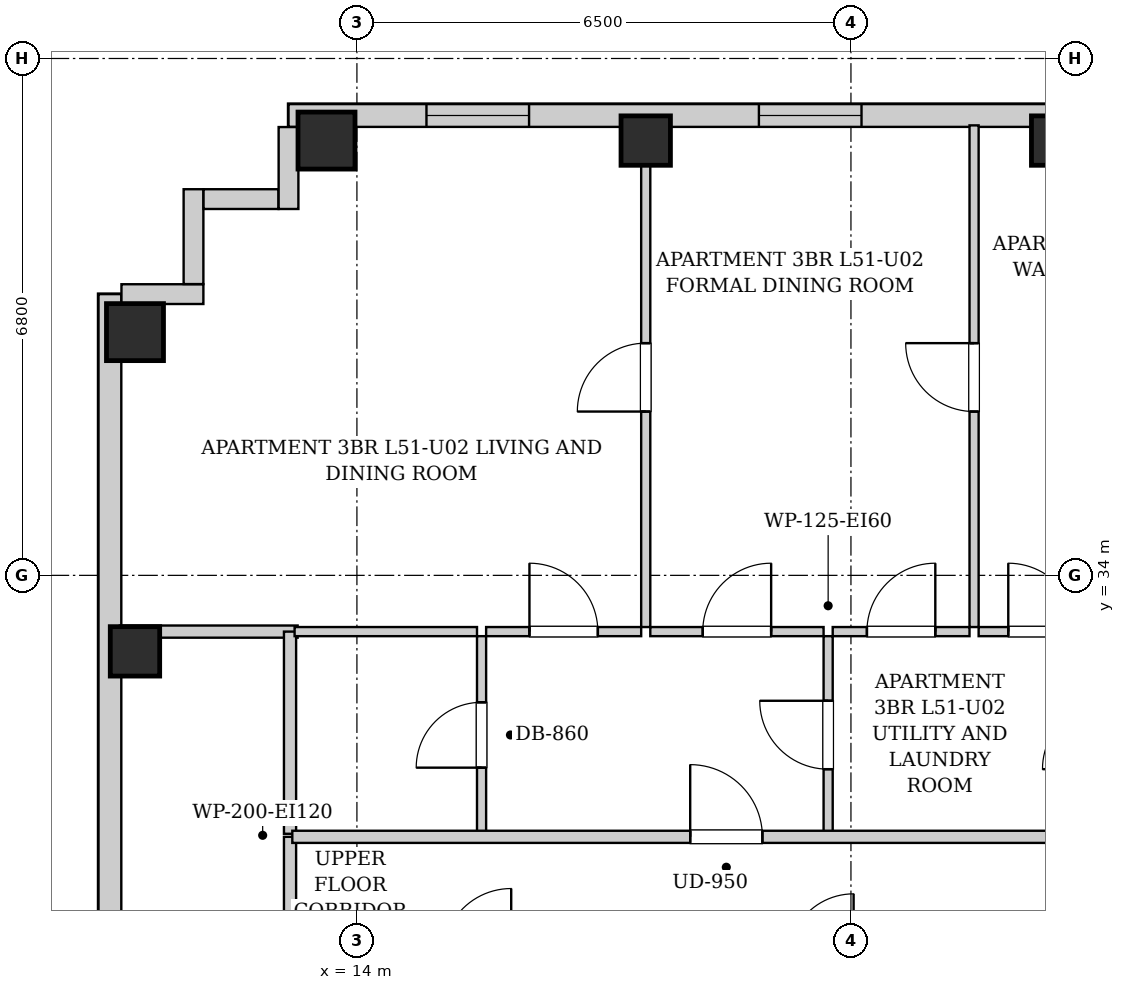
"""IFC4 building model, lengths in metres.
Left out: names, types, materials, properties, quantities, classifications, styles, units other than length and angle.
Written with IfcOpenShell. Run it as: python <this file> out.ifc"""

import sys

from ifc_helpers import new_model, si_unit, direction, frame, frame_2d, origin, origin_2d, place, context, subcontext, project, spatial, rectangle, extrude, element, fill, save


model = new_model("IFC4")
c1 = context("Model", 3, precision=1e-05, world=origin(), true_north=direction((0.0, 1.0)))
c2 = subcontext(c1, "Body", "Model", "MODEL_VIEW")
j1 = project(units=[si_unit("LENGTHUNIT", "METRE"), si_unit("PLANEANGLEUNIT", "RADIAN")], contexts=[c1])
p1 = place(None, origin())
s1 = spatial("IfcSite", under=j1, at=p1, CompositionType="ELEMENT")
p2 = place(p1, origin())
s2 = spatial("IfcBuilding", under=s1, at=p2, CompositionType="ELEMENT")
p3 = place(p2, frame((0.0, 0.0, 177.7)))
s3 = spatial("IfcBuildingStorey", under=s2, at=p3, CompositionType="ELEMENT", Elevation=177.7)
p4 = place(p3, frame((13.6, 39.72, 0.0), z_axis=(0.0, 0.0, 1.0), x_axis=(1.0, 0.0, 0.0)))
e1 = element("IfcColumn", 1, at=p4, inside=s3, PredefinedType="COLUMN", context=c2, shape_type="SweptSolid", body=[
    extrude(rectangle(XDim=0.75, YDim=0.75, at=origin_2d()), origin(), (0.0, 0.0, 1.0), 3.3),
])
for number, where, z_axis, x_axis in (
    (2, (17.8, 39.72, 0.0), (0.0, 0.0, 1.0), (1.0, 0.0, 0.0)),
    (3, (23.2, 39.72, 0.0), (0.0, 0.0, 1.0), (1.0, 0.0, 0.0)),
    (4, (11.08, 33.0, 0.0), (0.0, 0.0, 1.0), (1.0, 0.0, 0.0)),
):
    element("IfcColumn", number, at=place(p3, frame(where, z_axis=z_axis, x_axis=x_axis)), inside=s3, PredefinedType="COLUMN", context=c2, shape_type="SweptSolid", body=[
        extrude(rectangle(XDim=0.65, YDim=0.65, at=origin_2d()), origin(), (0.0, 0.0, 1.0), 3.3),
    ])
p5 = place(p3, frame((11.08, 37.2, 0.0), z_axis=(0.0, 0.0, 1.0), x_axis=(1.0, 0.0, 0.0)))
e5 = element("IfcColumn", 5, at=p5, inside=s3, PredefinedType="COLUMN", context=c2, shape_type="SweptSolid", body=[
    extrude(rectangle(XDim=0.75, YDim=0.75, at=origin_2d()), origin(), (0.0, 0.0, 1.0), 3.3),
])
p6 = place(p3, frame((13.1, 40.05, 0.0), z_axis=(0.0, 0.0, 1.0), x_axis=(1.0, 0.0, 0.0)))
e6 = element("IfcWall", 6, at=p6, inside=s3, PredefinedType="SOLIDWALL", context=c2, shape_type="SweptSolid", body=[
    extrude(rectangle(XDim=17.5, YDim=0.3, at=frame_2d((8.75, 0.0))), origin(), (0.0, 0.0, 1.0), 3.04),
])
p7 = place(p6, frame((1.815, 0.0, 0.55)))
e7 = element("IfcOpeningElement", 7, at=p7, cuts=e6, PredefinedType="OPENING", context=c2, shape_type="SweptSolid", body=[
    extrude(rectangle(XDim=1.35, YDim=1.2, at=frame_2d((0.675, 0.6))), frame((0.0, 0.16, 0.0), z_axis=(0.0, -1.0, 0.0), x_axis=(1.0, 0.0, 0.0)), (0.0, 0.0, 1.0), 0.32),
])
p8 = place(p6, frame((6.189, 0.0, 0.55)))
e8 = element("IfcOpeningElement", 8, at=p8, cuts=e6, PredefinedType="OPENING", context=c2, shape_type="SweptSolid", body=[
    extrude(rectangle(XDim=1.35, YDim=1.2, at=frame_2d((0.675, 0.6))), frame((0.0, 0.16, 0.0), z_axis=(0.0, -1.0, 0.0), x_axis=(1.0, 0.0, 0.0)), (0.0, 0.0, 1.0), 0.32),
])
p9 = place(p6, frame((14.788, 0.0, 0.55)))
e9 = element("IfcOpeningElement", 9, at=p9, cuts=e6, PredefinedType="OPENING", context=c2, shape_type="SweptSolid", body=[
    extrude(rectangle(XDim=1.35, YDim=1.2, at=frame_2d((0.675, 0.6))), frame((0.0, 0.16, 0.0), z_axis=(0.0, -1.0, 0.0), x_axis=(1.0, 0.0, 0.0)), (0.0, 0.0, 1.0), 0.32),
])
p10 = place(p3, frame((10.75, 6.3, 0.0), z_axis=(0.0, 0.0, 1.0), x_axis=(0.0, 1.0, 0.0)))
e10 = element("IfcWall", 10, at=p10, inside=s3, PredefinedType="SOLIDWALL", context=c2, shape_type="SweptSolid", body=[
    extrude(rectangle(XDim=31.4, YDim=0.3, at=frame_2d((15.7, 0.0))), origin(), (0.0, 0.0, 1.0), 3.04),
])
p11 = place(p10, frame((1.653, 0.0, 0.55)))
e11 = element("IfcOpeningElement", 11, at=p11, cuts=e10, PredefinedType="OPENING", context=c2, shape_type="SweptSolid", body=[
    extrude(rectangle(XDim=1.35, YDim=1.2, at=frame_2d((0.675, 0.6))), frame((0.0, 0.16, 0.0), z_axis=(0.0, -1.0, 0.0), x_axis=(1.0, 0.0, 0.0)), (0.0, 0.0, 1.0), 0.32),
])
p12 = place(p10, frame((11.85, 0.0, 0.55)))
e12 = element("IfcOpeningElement", 12, at=p12, cuts=e10, PredefinedType="OPENING", context=c2, shape_type="SweptSolid", body=[
    extrude(rectangle(XDim=1.35, YDim=1.2, at=frame_2d((0.675, 0.6))), frame((0.0, 0.16, 0.0), z_axis=(0.0, -1.0, 0.0), x_axis=(1.0, 0.0, 0.0)), (0.0, 0.0, 1.0), 0.32),
])
p13 = place(p10, frame((9.185, 0.0, 0.55)))
e13 = element("IfcOpeningElement", 13, at=p13, cuts=e10, PredefinedType="OPENING", context=c2, shape_type="SweptSolid", body=[
    extrude(rectangle(XDim=1.35, YDim=1.2, at=frame_2d((0.675, 0.6))), frame((0.0, 0.16, 0.0), z_axis=(0.0, -1.0, 0.0), x_axis=(1.0, 0.0, 0.0)), (0.0, 0.0, 1.0), 0.32),
])
p14 = place(p10, frame((21.209, 0.0, 0.55)))
e14 = element("IfcOpeningElement", 14, at=p14, cuts=e10, PredefinedType="OPENING", context=c2, shape_type="SweptSolid", body=[
    extrude(rectangle(XDim=0.85, YDim=1.2, at=frame_2d((0.425, 0.6))), frame((0.0, 0.16, 0.0), z_axis=(0.0, -1.0, 0.0), x_axis=(1.0, 0.0, 0.0)), (0.0, 0.0, 1.0), 0.32),
])
p15 = place(p3, frame((10.902, 37.7, 0.0), z_axis=(0.0, 0.0, 1.0), x_axis=(1.0, 0.0, 0.0)))
e15 = element("IfcWall", 15, at=p15, inside=s3, PredefinedType="SOLIDWALL", context=c2, shape_type="SweptSolid", body=[
    extrude(rectangle(XDim=1.078, YDim=0.26, at=frame_2d((0.539, 0.0))), origin(), (0.0, 0.0, 1.0), 3.04),
])
p16 = place(p3, frame((11.85, 37.832, 0.0), z_axis=(0.0, 0.0, 1.0), x_axis=(0.0, 1.0, 0.0)))
e16 = element("IfcWall", 16, at=p16, inside=s3, PredefinedType="SOLIDWALL", context=c2, shape_type="SweptSolid", body=[
    extrude(rectangle(XDim=1.248, YDim=0.26, at=frame_2d((0.624, 0.0))), origin(), (0.0, 0.0, 1.0), 3.04),
])
p17 = place(p3, frame((11.982, 38.95, 0.0), z_axis=(0.0, 0.0, 1.0), x_axis=(1.0, 0.0, 0.0)))
e17 = element("IfcWall", 17, at=p17, inside=s3, PredefinedType="SOLIDWALL", context=c2, shape_type="SweptSolid", body=[
    extrude(rectangle(XDim=0.986, YDim=0.26, at=frame_2d((0.493, 0.0))), origin(), (0.0, 0.0, 1.0), 3.04),
])
p18 = place(p3, frame((13.1, 38.82, 0.0), z_axis=(0.0, 0.0, 1.0), x_axis=(0.0, 1.0, 0.0)))
e18 = element("IfcWall", 18, at=p18, inside=s3, PredefinedType="SOLIDWALL", context=c2, shape_type="SweptSolid", body=[
    extrude(rectangle(XDim=1.078, YDim=0.26, at=frame_2d((0.539, 0.0))), origin(), (0.0, 0.0, 1.0), 3.04),
])
p19 = place(p3, frame((13.12, 28.98, 0.0), z_axis=(0.0, 0.0, 1.0), x_axis=(0.0, 1.0, 0.0)))
e19 = element("IfcWall", 19, at=p19, inside=s3, PredefinedType="PARTITIONING", context=c2, shape_type="SweptSolid", body=[
    extrude(rectangle(XDim=1.58, YDim=0.16, at=frame_2d((0.79, 0.0))), origin(), (0.0, 0.0, 1.0), 3.04),
])
p20 = place(p3, frame((10.88, 33.26, 0.0), z_axis=(0.0, 0.0, 1.0), x_axis=(1.0, 0.0, 0.0)))
e20 = element("IfcWall", 20, at=p20, inside=s3, PredefinedType="PARTITIONING", context=c2, shape_type="SweptSolid", body=[
    extrude(rectangle(XDim=2.34, YDim=0.16, at=frame_2d((1.17, 0.0))), origin(), (0.0, 0.0, 1.0), 3.04),
])
p21 = place(p3, frame((13.12, 30.6, 0.0), z_axis=(0.0, 0.0, 1.0), x_axis=(0.0, 1.0, 0.0)))
e21 = element("IfcWall", 21, at=p21, inside=s3, PredefinedType="PARTITIONING", context=c2, shape_type="SweptSolid", body=[
    extrude(rectangle(XDim=2.66, YDim=0.16, at=frame_2d((1.33, 0.0))), origin(), (0.0, 0.0, 1.0), 3.04),
])
p22 = place(p3, frame((15.64, 30.6, 0.0), z_axis=(0.0, 0.0, 1.0), x_axis=(0.0, 1.0, 0.0)))
e22 = element("IfcWall", 22, at=p22, inside=s3, PredefinedType="PARTITIONING", context=c2, shape_type="SweptSolid", body=[
    extrude(rectangle(XDim=2.6, YDim=0.12, at=frame_2d((1.3, 0.0))), origin(), (0.0, 0.0, 1.0), 3.04),
])
p23 = place(p22, frame((0.87, 0.0, 0.0)))
e23 = element("IfcOpeningElement", 23, at=p23, cuts=e22, PredefinedType="OPENING", context=c2, shape_type="SweptSolid", body=[
    extrude(rectangle(XDim=0.86, YDim=2.05, at=frame_2d((0.43, 1.025))), frame((0.0, 0.07, 0.0), z_axis=(0.0, -1.0, 0.0), x_axis=(1.0, 0.0, 0.0)), (0.0, 0.0, 1.0), 0.14),
])
p24 = place(p3, frame((13.18, 33.26, 0.0), z_axis=(0.0, 0.0, 1.0), x_axis=(1.0, 0.0, 0.0)))
e24 = element("IfcWall", 24, at=p24, inside=s3, PredefinedType="PARTITIONING", context=c2, shape_type="SweptSolid", body=[
    extrude(rectangle(XDim=2.4, YDim=0.12, at=frame_2d((1.2, 0.0))), origin(), (0.0, 0.0, 1.0), 3.04),
])
p25 = place(p3, frame((20.2, 30.6, 0.0), z_axis=(0.0, 0.0, 1.0), x_axis=(0.0, 1.0, 0.0)))
e25 = element("IfcWall", 25, at=p25, inside=s3, PredefinedType="PARTITIONING", context=c2, shape_type="SweptSolid", body=[
    extrude(rectangle(XDim=2.6, YDim=0.12, at=frame_2d((1.3, 0.0))), origin(), (0.0, 0.0, 1.0), 3.04),
])
p26 = place(p25, frame((0.85, 0.0, 0.0)))
e26 = element("IfcOpeningElement", 26, at=p26, cuts=e25, PredefinedType="OPENING", context=c2, shape_type="SweptSolid", body=[
    extrude(rectangle(XDim=0.9, YDim=2.05, at=frame_2d((0.45, 1.025))), frame((0.0, 0.07, 0.0), z_axis=(0.0, -1.0, 0.0), x_axis=(1.0, 0.0, 0.0)), (0.0, 0.0, 1.0), 0.14),
])
p27 = place(p3, frame((15.7, 33.26, 0.0), z_axis=(0.0, 0.0, 1.0), x_axis=(1.0, 0.0, 0.0)))
e27 = element("IfcWall", 27, at=p27, inside=s3, PredefinedType="PARTITIONING", context=c2, shape_type="SweptSolid", body=[
    extrude(rectangle(XDim=2.04, YDim=0.12, at=frame_2d((1.02, 0.0))), origin(), (0.0, 0.0, 1.0), 3.04),
])
p28 = place(p27, frame((0.57, 0.0, 0.0)))
e28 = element("IfcOpeningElement", 28, at=p28, cuts=e27, PredefinedType="OPENING", context=c2, shape_type="SweptSolid", body=[
    extrude(rectangle(XDim=0.9, YDim=2.05, at=frame_2d((0.45, 1.025))), frame((0.0, 0.07, 0.0), z_axis=(0.0, -1.0, 0.0), x_axis=(1.0, 0.0, 0.0)), (0.0, 0.0, 1.0), 0.14),
])
p29 = place(p3, frame((17.86, 33.26, 0.0), z_axis=(0.0, 0.0, 1.0), x_axis=(1.0, 0.0, 0.0)))
e29 = element("IfcWall", 29, at=p29, inside=s3, PredefinedType="PARTITIONING", context=c2, shape_type="SweptSolid", body=[
    extrude(rectangle(XDim=2.28, YDim=0.12, at=frame_2d((1.14, 0.0))), origin(), (0.0, 0.0, 1.0), 3.04),
])
p30 = place(p29, frame((0.69, 0.0, 0.0)))
e30 = element("IfcOpeningElement", 30, at=p30, cuts=e29, PredefinedType="OPENING", context=c2, shape_type="SweptSolid", body=[
    extrude(rectangle(XDim=0.9, YDim=2.05, at=frame_2d((0.45, 1.025))), frame((0.0, 0.07, 0.0), z_axis=(0.0, -1.0, 0.0), x_axis=(1.0, 0.0, 0.0)), (0.0, 0.0, 1.0), 0.14),
])
p31 = place(p3, frame((20.26, 33.26, 0.0), z_axis=(0.0, 0.0, 1.0), x_axis=(1.0, 0.0, 0.0)))
e31 = element("IfcWall", 31, at=p31, inside=s3, PredefinedType="PARTITIONING", context=c2, shape_type="SweptSolid", body=[
    extrude(rectangle(XDim=1.8, YDim=0.12, at=frame_2d((0.9, 0.0))), origin(), (0.0, 0.0, 1.0), 3.04),
])
p32 = place(p31, frame((0.45, 0.0, 0.0)))
e32 = element("IfcOpeningElement", 32, at=p32, cuts=e31, PredefinedType="OPENING", context=c2, shape_type="SweptSolid", body=[
    extrude(rectangle(XDim=0.9, YDim=2.05, at=frame_2d((0.45, 1.025))), frame((0.0, 0.07, 0.0), z_axis=(0.0, -1.0, 0.0), x_axis=(1.0, 0.0, 0.0)), (0.0, 0.0, 1.0), 0.14),
])
p33 = place(p3, frame((22.18, 33.26, 0.0), z_axis=(0.0, 0.0, 1.0), x_axis=(1.0, 0.0, 0.0)))
e33 = element("IfcWall", 33, at=p33, inside=s3, PredefinedType="PARTITIONING", context=c2, shape_type="SweptSolid", body=[
    extrude(rectangle(XDim=1.68, YDim=0.12, at=frame_2d((0.84, 0.0))), origin(), (0.0, 0.0, 1.0), 3.04),
])
p34 = place(p33, frame((0.39, 0.0, 0.0)))
e34 = element("IfcOpeningElement", 34, at=p34, cuts=e33, PredefinedType="OPENING", context=c2, shape_type="SweptSolid", body=[
    extrude(rectangle(XDim=0.9, YDim=2.05, at=frame_2d((0.45, 1.025))), frame((0.0, 0.07, 0.0), z_axis=(0.0, -1.0, 0.0), x_axis=(1.0, 0.0, 0.0)), (0.0, 0.0, 1.0), 0.14),
])
p35 = place(p3, frame((17.8, 33.32, 0.0), z_axis=(0.0, 0.0, 1.0), x_axis=(0.0, 1.0, 0.0)))
e35 = element("IfcWall", 35, at=p35, inside=s3, PredefinedType="PARTITIONING", context=c2, shape_type="SweptSolid", body=[
    extrude(rectangle(XDim=6.6, YDim=0.12, at=frame_2d((3.3, 0.0))), origin(), (0.0, 0.0, 1.0), 2.556),
])
p36 = place(p35, frame((2.835, 0.0, 0.0)))
e36 = element("IfcOpeningElement", 36, at=p36, cuts=e35, PredefinedType="OPENING", context=c2, shape_type="SweptSolid", body=[
    extrude(rectangle(XDim=0.9, YDim=2.05, at=frame_2d((0.45, 1.025))), frame((0.0, 0.07, 0.0), z_axis=(0.0, -1.0, 0.0), x_axis=(1.0, 0.0, 0.0)), (0.0, 0.0, 1.0), 0.14),
])
p37 = place(p3, frame((22.12, 33.32, 0.0), z_axis=(0.0, 0.0, 1.0), x_axis=(0.0, 1.0, 0.0)))
e37 = element("IfcWall", 37, at=p37, inside=s3, PredefinedType="PARTITIONING", context=c2, shape_type="SweptSolid", body=[
    extrude(rectangle(XDim=6.6, YDim=0.12, at=frame_2d((3.3, 0.0))), origin(), (0.0, 0.0, 1.0), 3.04),
])
p38 = place(p37, frame((2.835, 0.0, 0.0)))
e38 = element("IfcOpeningElement", 38, at=p38, cuts=e37, PredefinedType="OPENING", context=c2, shape_type="SweptSolid", body=[
    extrude(rectangle(XDim=0.9, YDim=2.05, at=frame_2d((0.45, 1.025))), frame((0.0, 0.07, 0.0), z_axis=(0.0, -1.0, 0.0), x_axis=(1.0, 0.0, 0.0)), (0.0, 0.0, 1.0), 0.14),
])
p39 = place(p3, frame((13.15, 30.56, 0.0), z_axis=(0.0, 0.0, 1.0), x_axis=(1.0, 0.0, 0.0)))
e39 = element("IfcWall", 39, at=p39, inside=s3, PredefinedType="PARTITIONING", context=c2, shape_type="SweptSolid", body=[
    extrude(rectangle(XDim=24.6, YDim=0.16, at=frame_2d((12.3, 0.0))), origin(), (0.0, 0.0, 1.0), 3.04),
])
p40 = place(p39, frame((5.235, 0.0, 0.0)))
e40 = element("IfcOpeningElement", 40, at=p40, cuts=e39, PredefinedType="OPENING", context=c2, shape_type="SweptSolid", body=[
    extrude(rectangle(XDim=0.95, YDim=2.1, at=frame_2d((0.475, 1.05))), frame((0.0, 0.09, 0.0), z_axis=(0.0, -1.0, 0.0), x_axis=(1.0, 0.0, 0.0)), (0.0, 0.0, 1.0), 0.18),
])
p41 = place(p23, origin())
e41 = element("IfcDoor", 41, at=p41, inside=s3, OperationType="SINGLE_SWING_LEFT", PredefinedType="DOOR", context=c2, shape_type="SweptSolid", body=[
    extrude(rectangle(XDim=0.86, YDim=2.05, at=frame_2d((0.43, 1.025))), frame((0.0, 0.025, 0.0), z_axis=(0.0, -1.0, 0.0), x_axis=(1.0, 0.0, 0.0)), (0.0, 0.0, 1.0), 0.05),
])
fill(e23, e41)
p42 = place(p26, origin())
e42 = element("IfcDoor", 42, at=p42, inside=s3, OperationType="SINGLE_SWING_RIGHT", PredefinedType="DOOR", context=c2, shape_type="SweptSolid", body=[
    extrude(rectangle(XDim=0.9, YDim=2.05, at=frame_2d((0.45, 1.025))), frame((0.0, 0.025, 0.0), z_axis=(0.0, -1.0, 0.0), x_axis=(1.0, 0.0, 0.0)), (0.0, 0.0, 1.0), 0.05),
])
fill(e26, e42)
p43 = place(p28, origin())
e43 = element("IfcDoor", 43, at=p43, inside=s3, OperationType="SINGLE_SWING_LEFT", PredefinedType="DOOR", context=c2, shape_type="SweptSolid", body=[
    extrude(rectangle(XDim=0.9, YDim=2.05, at=frame_2d((0.45, 1.025))), frame((0.0, 0.025, 0.0), z_axis=(0.0, -1.0, 0.0), x_axis=(1.0, 0.0, 0.0)), (0.0, 0.0, 1.0), 0.05),
])
fill(e28, e43)
p44 = place(p30, origin())
e44 = element("IfcDoor", 44, at=p44, inside=s3, OperationType="SINGLE_SWING_RIGHT", PredefinedType="DOOR", context=c2, shape_type="SweptSolid", body=[
    extrude(rectangle(XDim=0.9, YDim=2.05, at=frame_2d((0.45, 1.025))), frame((0.0, 0.025, 0.0), z_axis=(0.0, -1.0, 0.0), x_axis=(1.0, 0.0, 0.0)), (0.0, 0.0, 1.0), 0.05),
])
fill(e30, e44)
p45 = place(p32, origin())
e45 = element("IfcDoor", 45, at=p45, inside=s3, OperationType="SINGLE_SWING_RIGHT", PredefinedType="DOOR", context=c2, shape_type="SweptSolid", body=[
    extrude(rectangle(XDim=0.9, YDim=2.05, at=frame_2d((0.45, 1.025))), frame((0.0, 0.025, 0.0), z_axis=(0.0, -1.0, 0.0), x_axis=(1.0, 0.0, 0.0)), (0.0, 0.0, 1.0), 0.05),
])
fill(e32, e45)
p46 = place(p34, origin())
e46 = element("IfcDoor", 46, at=p46, inside=s3, OperationType="SINGLE_SWING_LEFT", PredefinedType="DOOR", context=c2, shape_type="SweptSolid", body=[
    extrude(rectangle(XDim=0.9, YDim=2.05, at=frame_2d((0.45, 1.025))), frame((0.0, 0.025, 0.0), z_axis=(0.0, -1.0, 0.0), x_axis=(1.0, 0.0, 0.0)), (0.0, 0.0, 1.0), 0.05),
])
fill(e34, e46)
p47 = place(p36, origin())
e47 = element("IfcDoor", 47, at=p47, inside=s3, OperationType="SINGLE_SWING_LEFT", PredefinedType="DOOR", context=c2, shape_type="SweptSolid", body=[
    extrude(rectangle(XDim=0.9, YDim=2.05, at=frame_2d((0.45, 1.025))), frame((0.0, 0.025, 0.0), z_axis=(0.0, -1.0, 0.0), x_axis=(1.0, 0.0, 0.0)), (0.0, 0.0, 1.0), 0.05),
])
fill(e36, e47)
p48 = place(p38, origin())
e48 = element("IfcDoor", 48, at=p48, inside=s3, OperationType="SINGLE_SWING_RIGHT", PredefinedType="DOOR", context=c2, shape_type="SweptSolid", body=[
    extrude(rectangle(XDim=0.9, YDim=2.05, at=frame_2d((0.45, 1.025))), frame((0.0, 0.025, 0.0), z_axis=(0.0, -1.0, 0.0), x_axis=(1.0, 0.0, 0.0)), (0.0, 0.0, 1.0), 0.05),
])
fill(e38, e48)
p49 = place(p40, origin())
e49 = element("IfcDoor", 49, at=p49, inside=s3, OperationType="SINGLE_SWING_LEFT", PredefinedType="DOOR", context=c2, shape_type="SweptSolid", body=[
    extrude(rectangle(XDim=0.95, YDim=2.1, at=frame_2d((0.475, 1.05))), frame((0.0, 0.025, 0.0), z_axis=(0.0, -1.0, 0.0), x_axis=(1.0, 0.0, 0.0)), (0.0, 0.0, 1.0), 0.05),
])
fill(e40, e49)
p50 = place(p7, origin())
e50 = element("IfcWindow", 50, at=p50, inside=s3, PartitioningType="SINGLE_PANEL", PredefinedType="WINDOW", context=c2, shape_type="SweptSolid", body=[
    extrude(rectangle(XDim=1.35, YDim=1.2, at=frame_2d((0.675, 0.6))), frame((0.0, 0.03, 0.0), z_axis=(0.0, -1.0, 0.0), x_axis=(1.0, 0.0, 0.0)), (0.0, 0.0, 1.0), 0.06),
])
fill(e7, e50)
p51 = place(p8, origin())
e51 = element("IfcWindow", 51, at=p51, inside=s3, PartitioningType="SINGLE_PANEL", PredefinedType="WINDOW", context=c2, shape_type="SweptSolid", body=[
    extrude(rectangle(XDim=1.35, YDim=1.2, at=frame_2d((0.675, 0.6))), frame((0.0, 0.03, 0.0), z_axis=(0.0, -1.0, 0.0), x_axis=(1.0, 0.0, 0.0)), (0.0, 0.0, 1.0), 0.06),
])
fill(e8, e51)
save(model, sys.argv[1])
